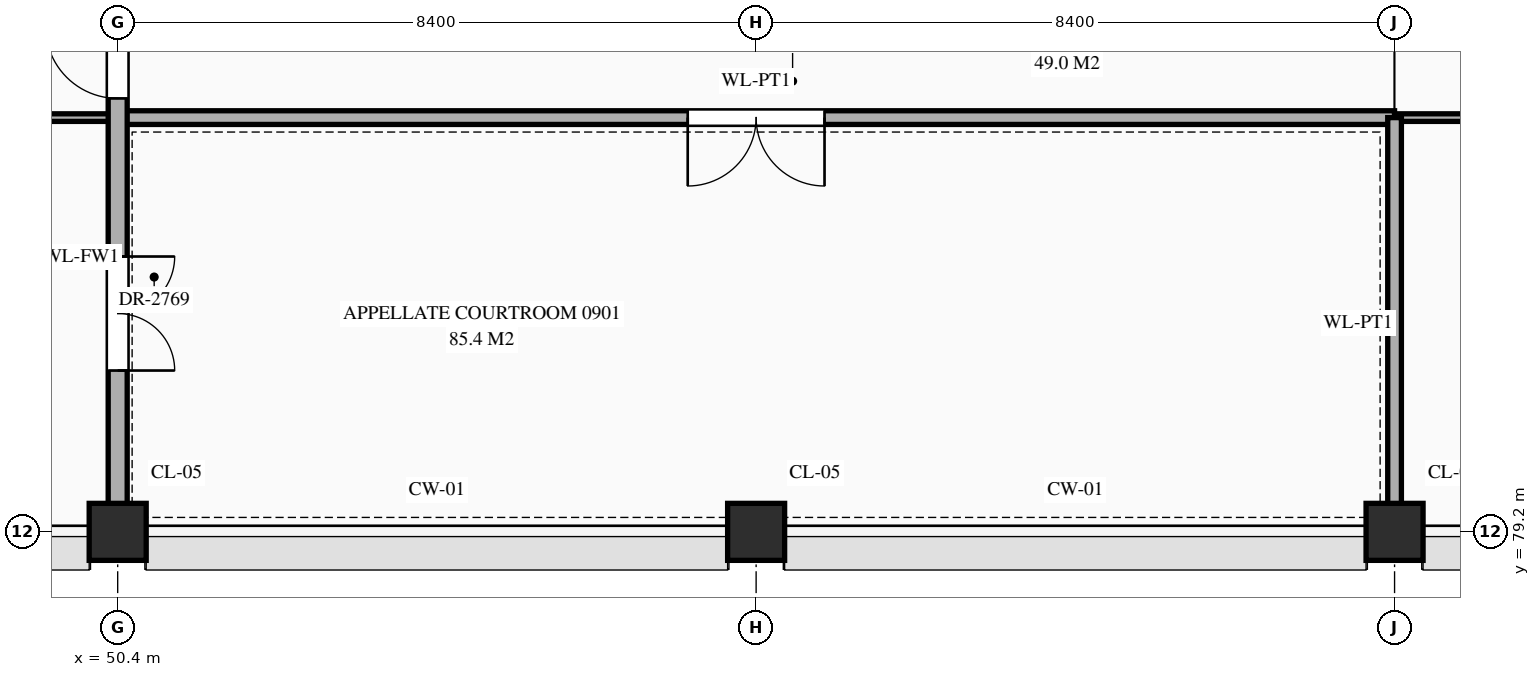
"""IFC4 building model, lengths in metres.
Left out: names, types, materials, properties, quantities, classifications, styles, units other than length and angle.
Written with IfcOpenShell. Run it as: python <this file> out.ifc"""

import sys

from ifc_helpers import new_model, si_unit, direction, frame, frame_2d, origin, origin_2d, place, context, subcontext, project, spatial, rectangle, extrude, element, fill, save


model = new_model("IFC4")
c1 = context("Model", 3, precision=1e-05, world=origin(), true_north=direction((0.0, 1.0)))
c2 = subcontext(c1, "Body", "Model", "MODEL_VIEW")
j1 = project(units=[si_unit("LENGTHUNIT", "METRE"), si_unit("PLANEANGLEUNIT", "RADIAN")], contexts=[c1])
p1 = place(None, origin())
s1 = spatial("IfcSite", under=j1, at=p1, CompositionType="ELEMENT")
p2 = place(p1, origin())
s2 = spatial("IfcBuilding", under=s1, at=p2, CompositionType="ELEMENT")
p3 = place(p2, frame((0.0, 0.0, 39.3)))
s3 = spatial("IfcBuildingStorey", under=s2, at=p3, CompositionType="ELEMENT", Elevation=39.3)
for number, where, z_axis, x_axis in (
    (1, (50.4, 79.2, 0.0), (0.0, 0.0, 1.0), (1.0, 0.0, 0.0)),
    (2, (58.8, 79.2, 0.0), (0.0, 0.0, 1.0), (1.0, 0.0, 0.0)),
    (3, (67.2, 79.2, 0.0), (0.0, 0.0, 1.0), (1.0, 0.0, 0.0)),
):
    element("IfcColumn", number, at=place(p3, frame(where, z_axis=z_axis, x_axis=x_axis)), inside=s3, PredefinedType="COLUMN", context=c2, shape_type="SweptSolid", body=[
        extrude(rectangle(XDim=0.75, YDim=0.75, at=origin_2d()), origin(), (0.0, 0.0, 1.0), 4.2),
    ])
p4 = place(p3, frame((42.04, 84.65, 0.0), z_axis=(0.0, 0.0, 1.0), x_axis=(1.0, 0.0, 0.0)))
e4 = element("IfcWall", 4, at=p4, inside=s3, PredefinedType="STANDARD", context=c2, shape_type="SweptSolid", body=[
    extrude(rectangle(XDim=8.36, YDim=0.1, at=frame_2d((4.18, 0.0))), origin(), (0.0, 0.0, 1.0), 3.95),
])
p5 = place(p4, frame((3.455, 0.0, 0.0)))
e5 = element("IfcOpeningElement", 5, at=p5, cuts=e4, PredefinedType="OPENING", context=c2, shape_type="SweptSolid", body=[
    extrude(rectangle(XDim=1.45, YDim=2.3, at=frame_2d((0.725, 1.15))), frame((0.0, 0.062, 0.0), z_axis=(0.0, -1.0, 0.0), x_axis=(1.0, 0.0, 0.0)), (0.0, 0.0, 1.0), 0.124),
])
p6 = place(p3, frame((50.4, 84.65, 0.0), z_axis=(0.0, 0.0, 1.0), x_axis=(1.0, 0.0, 0.0)))
e6 = element("IfcWall", 6, at=p6, inside=s3, PredefinedType="STANDARD", context=c2, shape_type="SweptSolid", body=[
    extrude(rectangle(XDim=16.8, YDim=0.18, at=frame_2d((8.4, 0.0))), origin(), (0.0, 0.0, 1.0), 3.95),
])
p7 = place(p6, frame((7.5, 0.0, 0.0)))
e7 = element("IfcOpeningElement", 7, at=p7, cuts=e6, PredefinedType="OPENING", context=c2, shape_type="SweptSolid", body=[
    extrude(rectangle(XDim=1.8, YDim=2.5, at=frame_2d((0.9, 1.25))), frame((0.0, 0.102, 0.0), z_axis=(0.0, -1.0, 0.0), x_axis=(1.0, 0.0, 0.0)), (0.0, 0.0, 1.0), 0.204),
])
p8 = place(p3, frame((67.2, 84.65, 0.0), z_axis=(0.0, 0.0, 1.0), x_axis=(1.0, 0.0, 0.0)))
e8 = element("IfcWall", 8, at=p8, inside=s3, PredefinedType="STANDARD", context=c2, shape_type="SweptSolid", body=[
    extrude(rectangle(XDim=33.6, YDim=0.1, at=frame_2d((16.8, 0.0))), origin(), (0.0, 0.0, 1.0), 3.95),
])
p9 = place(p8, frame((7.575, 0.0, 0.0)))
e9 = element("IfcOpeningElement", 9, at=p9, cuts=e8, PredefinedType="OPENING", context=c2, shape_type="SweptSolid", body=[
    extrude(rectangle(XDim=1.65, YDim=2.4, at=frame_2d((0.825, 1.2))), frame((0.0, 0.062, 0.0), z_axis=(0.0, -1.0, 0.0), x_axis=(1.0, 0.0, 0.0)), (0.0, 0.0, 1.0), 0.124),
])
p10 = place(p8, frame((24.35, 0.0, 0.0)))
e10 = element("IfcOpeningElement", 10, at=p10, cuts=e8, PredefinedType="OPENING", context=c2, shape_type="SweptSolid", body=[
    extrude(rectangle(XDim=1.7, YDim=2.45, at=frame_2d((0.85, 1.225))), frame((0.0, 0.062, 0.0), z_axis=(0.0, -1.0, 0.0), x_axis=(1.0, 0.0, 0.0)), (0.0, 0.0, 1.0), 0.124),
])
p11 = place(p3, frame((50.4, 79.24, 0.0), z_axis=(0.0, 0.0, 1.0), x_axis=(0.0, 1.0, 0.0)))
e11 = element("IfcWall", 11, at=p11, inside=s3, PredefinedType="STANDARD", context=c2, shape_type="SweptSolid", body=[
    extrude(rectangle(XDim=7.16, YDim=0.25, at=frame_2d((3.58, 0.0))), origin(), (0.0, 0.0, 1.0), 3.2),
])
p12 = place(p11, frame((5.663, 0.0, 0.0)))
e12 = element("IfcOpeningElement", 12, at=p12, cuts=e11, PredefinedType="OPENING", context=c2, shape_type="SweptSolid", body=[
    extrude(rectangle(XDim=0.95, YDim=2.15, at=frame_2d((0.475, 1.075))), frame((0.0, 0.137, 0.0), z_axis=(0.0, -1.0, 0.0), x_axis=(1.0, 0.0, 0.0)), (0.0, 0.0, 1.0), 0.274),
])
p13 = place(p11, frame((2.083, 0.0, 0.0)))
e13 = element("IfcOpeningElement", 13, at=p13, cuts=e11, PredefinedType="OPENING", context=c2, shape_type="SweptSolid", body=[
    extrude(rectangle(XDim=1.5, YDim=2.25, at=frame_2d((0.75, 1.125))), frame((0.0, 0.137, 0.0), z_axis=(0.0, -1.0, 0.0), x_axis=(1.0, 0.0, 0.0)), (0.0, 0.0, 1.0), 0.274),
])
p14 = place(p3, frame((67.2, 79.24, 0.0), z_axis=(0.0, 0.0, 1.0), x_axis=(0.0, 1.0, 0.0)))
e14 = element("IfcWall", 14, at=p14, inside=s3, PredefinedType="STANDARD", context=c2, shape_type="SweptSolid", body=[
    extrude(rectangle(XDim=5.41, YDim=0.18, at=frame_2d((2.705, 0.0))), origin(), (0.0, 0.0, 1.0), 3.2),
])
p15 = place(p12, origin())
e15 = element("IfcDoor", 15, at=p15, inside=s3, OperationType="SINGLE_SWING_RIGHT", PredefinedType="DOOR", context=c2, shape_type="SweptSolid", body=[
    extrude(rectangle(XDim=0.95, YDim=2.15, at=frame_2d((0.475, 1.075))), frame((0.0, 0.025, 0.0), z_axis=(0.0, -1.0, 0.0), x_axis=(1.0, 0.0, 0.0)), (0.0, 0.0, 1.0), 0.05),
])
fill(e12, e15)
p16 = place(p7, frame((1.8, 0.0, 0.0), z_axis=(0.0, 0.0, 1.0), x_axis=(-1.0, 0.0, 0.0)))
e16 = element("IfcDoor", 16, at=p16, inside=s3, OperationType="DOUBLE_DOOR_SINGLE_SWING", PredefinedType="DOOR", context=c2, shape_type="SweptSolid", body=[
    extrude(rectangle(XDim=1.8, YDim=2.5, at=frame_2d((0.9, 1.25))), frame((0.0, 0.025, 0.0), z_axis=(0.0, -1.0, 0.0), x_axis=(1.0, 0.0, 0.0)), (0.0, 0.0, 1.0), 0.05),
])
fill(e7, e16)
p17 = place(p13, frame((1.5, 0.0, 0.0), z_axis=(0.0, 0.0, 1.0), x_axis=(-1.0, 0.0, 0.0)))
e17 = element("IfcDoor", 17, at=p17, inside=s3, OperationType="DOUBLE_DOOR_SINGLE_SWING", PredefinedType="DOOR", context=c2, shape_type="SweptSolid", body=[
    extrude(rectangle(XDim=1.5, YDim=2.25, at=frame_2d((0.75, 1.125))), frame((0.0, 0.025, 0.0), z_axis=(0.0, -1.0, 0.0), x_axis=(1.0, 0.0, 0.0)), (0.0, 0.0, 1.0), 0.05),
])
fill(e13, e17)
save(model, sys.argv[1])
